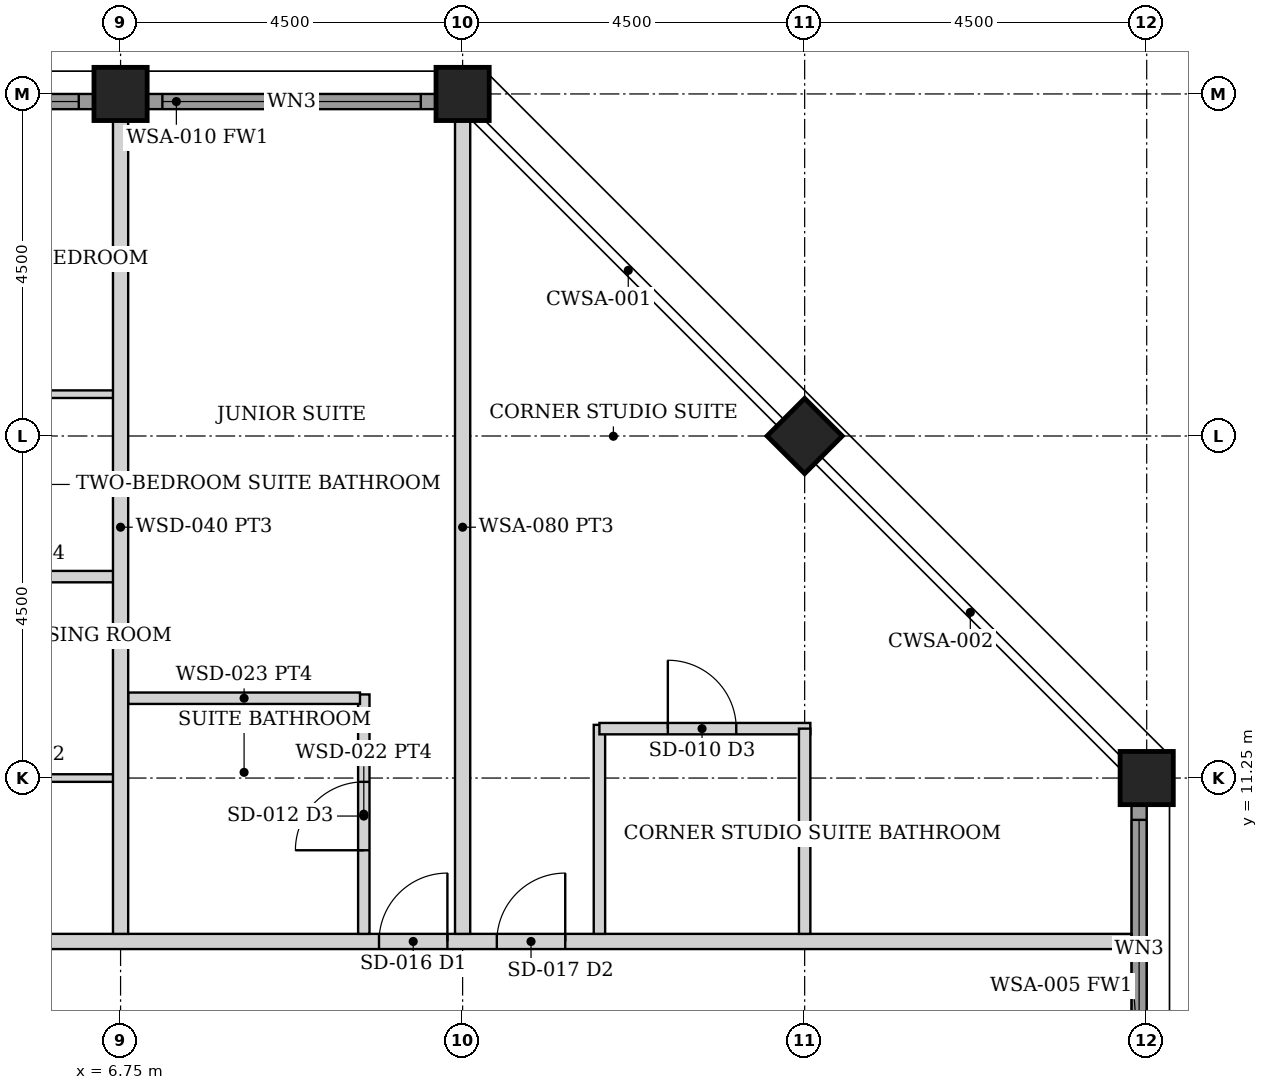
"""IFC4 building model, lengths in metres.
Left out: names, types, materials, properties, quantities, classifications, styles, units other than length and angle.
Written with IfcOpenShell. Run it as: python <this file> out.ifc"""

import sys

from ifc_helpers import new_model, si_unit, direction, frame, frame_2d, origin, origin_2d, place, context, subcontext, project, spatial, rectangle, hollow_rectangle, extrude, element, fill, save


model = new_model("IFC4")
c1 = context("Model", 3, precision=1e-05, world=origin(), true_north=direction((0.0, 1.0)))
c2 = subcontext(c1, "Body", "Model", "MODEL_VIEW")
j1 = project(units=[si_unit("LENGTHUNIT", "METRE"), si_unit("PLANEANGLEUNIT", "RADIAN")], contexts=[c1])
p1 = place(None, origin())
s1 = spatial("IfcSite", under=j1, at=p1, CompositionType="ELEMENT")
p2 = place(p1, origin())
s2 = spatial("IfcBuilding", under=s1, at=p2, CompositionType="ELEMENT")
p3 = place(p2, frame((0.0, 0.0, 234.55)))
s3 = spatial("IfcBuildingStorey", under=s2, at=p3, CompositionType="ELEMENT", Elevation=234.55)
for number, where, z_axis, x_axis in (
    (1, (6.75, 20.25, 0.0), (0.0, 0.0, 1.0), (0.0, 1.0, 0.0)),
    (2, (11.25, 20.25, 0.0), (0.0, 0.0, 1.0), (0.0, 1.0, 0.0)),
    (3, (20.25, 11.25, 0.0), (0.0, 0.0, 1.0), (1.0, 0.0, 0.0)),
    (4, (15.75, 15.75, 0.0), (0.0, 0.0, 1.0), (0.707, 0.707, 0.0)),
):
    element("IfcColumn", number, at=place(p3, frame(where, z_axis=z_axis, x_axis=x_axis)), inside=s3, PredefinedType="COLUMN", context=c2, shape_type="SweptSolid", body=[
        extrude(hollow_rectangle(XDim=0.7, YDim=0.7, WallThickness=0.04, at=origin_2d()), origin(), (0.0, 0.0, 1.0), 3.75),
    ])
p4 = place(p3, frame((20.15, 7.105, 0.0), z_axis=(0.0, 0.0, 1.0), x_axis=(0.0, 1.0, 0.0)))
e5 = element("IfcWall", 5, at=p4, inside=s3, PredefinedType="SOLIDWALL", context=c2, shape_type="SweptSolid", body=[
    extrude(rectangle(XDim=3.79, YDim=0.2, at=frame_2d((1.895, 0.0))), origin(), (0.0, 0.0, 1.0), 2.629),
])
p5 = place(p4, frame((0.195, 0.0, 0.3)))
e6 = element("IfcOpeningElement", 6, at=p5, cuts=e5, PredefinedType="OPENING", context=c2, shape_type="SweptSolid", body=[
    extrude(rectangle(XDim=3.4, YDim=2.179, at=frame_2d((1.7, 1.089))), frame((0.0, 0.11, 0.0), z_axis=(0.0, -1.0, 0.0), x_axis=(1.0, 0.0, 0.0)), (0.0, 0.0, 1.0), 0.22),
])
p6 = place(p3, frame((2.605, 20.15, 0.0), z_axis=(0.0, 0.0, 1.0), x_axis=(1.0, 0.0, 0.0)))
e7 = element("IfcWall", 7, at=p6, inside=s3, PredefinedType="SOLIDWALL", context=c2, shape_type="SweptSolid", body=[
    extrude(rectangle(XDim=3.79, YDim=0.2, at=frame_2d((1.895, 0.0))), origin(), (0.0, 0.0, 1.0), 2.629),
])
p7 = place(p6, frame((0.195, 0.0, 0.3)))
e8 = element("IfcOpeningElement", 8, at=p7, cuts=e7, PredefinedType="OPENING", context=c2, shape_type="SweptSolid", body=[
    extrude(rectangle(XDim=3.4, YDim=2.179, at=frame_2d((1.7, 1.089))), frame((0.0, 0.11, 0.0), z_axis=(0.0, -1.0, 0.0), x_axis=(1.0, 0.0, 0.0)), (0.0, 0.0, 1.0), 0.22),
])
p8 = place(p3, frame((7.105, 20.15, 0.0), z_axis=(0.0, 0.0, 1.0), x_axis=(1.0, 0.0, 0.0)))
e9 = element("IfcWall", 9, at=p8, inside=s3, PredefinedType="SOLIDWALL", context=c2, shape_type="SweptSolid", body=[
    extrude(rectangle(XDim=3.79, YDim=0.2, at=frame_2d((1.895, 0.0))), origin(), (0.0, 0.0, 1.0), 2.629),
])
p9 = place(p8, frame((0.195, 0.0, 0.3)))
e10 = element("IfcOpeningElement", 10, at=p9, cuts=e9, PredefinedType="OPENING", context=c2, shape_type="SweptSolid", body=[
    extrude(rectangle(XDim=3.4, YDim=2.179, at=frame_2d((1.7, 1.089))), frame((0.0, 0.11, 0.0), z_axis=(0.0, -1.0, 0.0), x_axis=(1.0, 0.0, 0.0)), (0.0, 0.0, 1.0), 0.22),
])
p10 = place(p3, frame((-20.05, 9.1, 0.0), z_axis=(0.0, 0.0, 1.0), x_axis=(1.0, 0.0, 0.0)))
e11 = element("IfcWall", 11, at=p10, inside=s3, PredefinedType="PARTITIONING", context=c2, shape_type="SweptSolid", body=[
    extrude(rectangle(XDim=40.1, YDim=0.2, at=frame_2d((20.05, 0.0))), origin(), (0.0, 0.0, 1.0), 2.629),
])
p11 = place(p10, frame((9.0, 0.0, 0.0)))
e12 = element("IfcOpeningElement", 12, at=p11, cuts=e11, PredefinedType="OPENING", context=c2, shape_type="SweptSolid", body=[
    extrude(rectangle(XDim=0.9, YDim=2.1, at=frame_2d((0.45, 1.05))), frame((0.0, 0.11, 0.0), z_axis=(0.0, -1.0, 0.0), x_axis=(1.0, 0.0, 0.0)), (0.0, 0.0, 1.0), 0.22),
])
p12 = place(p10, frame((13.6, 0.0, 0.0)))
e13 = element("IfcOpeningElement", 13, at=p12, cuts=e11, PredefinedType="OPENING", context=c2, shape_type="SweptSolid", body=[
    extrude(rectangle(XDim=0.9, YDim=2.1, at=frame_2d((0.45, 1.05))), frame((0.0, 0.11, 0.0), z_axis=(0.0, -1.0, 0.0), x_axis=(1.0, 0.0, 0.0)), (0.0, 0.0, 1.0), 0.22),
])
p13 = place(p10, frame((30.2, 0.0, 0.0)))
e14 = element("IfcOpeningElement", 14, at=p13, cuts=e11, PredefinedType="OPENING", context=c2, shape_type="SweptSolid", body=[
    extrude(rectangle(XDim=0.9, YDim=2.1, at=frame_2d((0.45, 1.05))), frame((0.0, 0.11, 0.0), z_axis=(0.0, -1.0, 0.0), x_axis=(1.0, 0.0, 0.0)), (0.0, 0.0, 1.0), 0.22),
])
p14 = place(p10, frame((31.75, 0.0, 0.0)))
e15 = element("IfcOpeningElement", 15, at=p14, cuts=e11, PredefinedType="OPENING", context=c2, shape_type="SweptSolid", body=[
    extrude(rectangle(XDim=0.9, YDim=2.1, at=frame_2d((0.45, 1.05))), frame((0.0, 0.11, 0.0), z_axis=(0.0, -1.0, 0.0), x_axis=(1.0, 0.0, 0.0)), (0.0, 0.0, 1.0), 0.22),
])
p15 = place(p10, frame((7.45, 0.0, 0.0)))
e16 = element("IfcOpeningElement", 16, at=p15, cuts=e11, PredefinedType="OPENING", context=c2, shape_type="SweptSolid", body=[
    extrude(rectangle(XDim=0.9, YDim=2.1, at=frame_2d((0.45, 1.05))), frame((0.0, 0.11, 0.0), z_axis=(0.0, -1.0, 0.0), x_axis=(1.0, 0.0, 0.0)), (0.0, 0.0, 1.0), 0.22),
])
p16 = place(p3, frame((3.55, 11.25, 0.0), z_axis=(0.0, 0.0, 1.0), x_axis=(1.0, 0.0, 0.0)))
e17 = element("IfcWall", 17, at=p16, inside=s3, PredefinedType="PARTITIONING", context=c2, shape_type="SweptSolid", body=[
    extrude(rectangle(XDim=3.14, YDim=0.1, at=frame_2d((1.57, 0.0))), origin(), (0.0, 0.0, 1.0), 2.629),
])
p17 = place(p3, frame((2.3, 16.3, 0.0), z_axis=(0.0, 0.0, 1.0), x_axis=(1.0, 0.0, 0.0)))
e18 = element("IfcWall", 18, at=p17, inside=s3, PredefinedType="PARTITIONING", context=c2, shape_type="SweptSolid", body=[
    extrude(rectangle(XDim=4.39, YDim=0.1, at=frame_2d((2.195, 0.0))), origin(), (0.0, 0.0, 1.0), 2.629),
])
p18 = place(p17, frame((0.175, 0.0, 0.0)))
e19 = element("IfcOpeningElement", 19, at=p18, cuts=e18, PredefinedType="OPENING", context=c2, shape_type="SweptSolid", body=[
    extrude(rectangle(XDim=0.85, YDim=2.1, at=frame_2d((0.425, 1.05))), frame((0.0, 0.06, 0.0), z_axis=(0.0, -1.0, 0.0), x_axis=(1.0, 0.0, 0.0)), (0.0, 0.0, 1.0), 0.12),
])
p19 = place(p17, frame((2.41, 0.0, 0.0)))
e20 = element("IfcOpeningElement", 20, at=p19, cuts=e18, PredefinedType="OPENING", context=c2, shape_type="SweptSolid", body=[
    extrude(rectangle(XDim=0.9, YDim=2.1, at=frame_2d((0.45, 1.05))), frame((0.0, 0.06, 0.0), z_axis=(0.0, -1.0, 0.0), x_axis=(1.0, 0.0, 0.0)), (0.0, 0.0, 1.0), 0.12),
])
p20 = place(p3, frame((3.55, 13.9, 0.0), z_axis=(0.0, 0.0, 1.0), x_axis=(1.0, 0.0, 0.0)))
e21 = element("IfcWall", 21, at=p20, inside=s3, PredefinedType="PARTITIONING", context=c2, shape_type="SweptSolid", body=[
    extrude(rectangle(XDim=3.14, YDim=0.15, at=frame_2d((1.57, 0.0))), origin(), (0.0, 0.0, 1.0), 2.629),
])
p21 = place(p3, frame((9.95, 9.2, 0.0), z_axis=(0.0, 0.0, 1.0), x_axis=(0.0, 1.0, 0.0)))
e22 = element("IfcWall", 22, at=p21, inside=s3, PredefinedType="PARTITIONING", context=c2, shape_type="SweptSolid", body=[
    extrude(rectangle(XDim=3.15, YDim=0.15, at=frame_2d((1.575, 0.0))), origin(), (0.0, 0.0, 1.0), 2.629),
])
p22 = place(p21, frame((1.1, 0.0, 0.0)))
e23 = element("IfcOpeningElement", 23, at=p22, cuts=e22, PredefinedType="OPENING", context=c2, shape_type="SweptSolid", body=[
    extrude(rectangle(XDim=0.9, YDim=2.1, at=frame_2d((0.45, 1.05))), frame((0.0, 0.085, 0.0), z_axis=(0.0, -1.0, 0.0), x_axis=(1.0, 0.0, 0.0)), (0.0, 0.0, 1.0), 0.17),
])
p23 = place(p3, frame((6.85, 12.3, 0.0), z_axis=(0.0, 0.0, 1.0), x_axis=(1.0, 0.0, 0.0)))
e24 = element("IfcWall", 24, at=p23, inside=s3, PredefinedType="PARTITIONING", context=c2, shape_type="SweptSolid", body=[
    extrude(rectangle(XDim=3.05, YDim=0.15, at=frame_2d((1.525, 0.0))), origin(), (0.0, 0.0, 1.0), 2.629),
])
for number, where, z_axis, x_axis in (
    (25, (6.75, 9.2, 0.0), (0.0, 0.0, 1.0), (0.0, 1.0, 0.0)),
    (26, (11.25, 9.2, 0.0), (0.0, 0.0, 1.0), (0.0, 1.0, 0.0)),
):
    element("IfcWall", number, at=place(p3, frame(where, z_axis=z_axis, x_axis=x_axis)), inside=s3, PredefinedType="PARTITIONING", context=c2, shape_type="SweptSolid", body=[
        extrude(rectangle(XDim=10.7, YDim=0.2, at=frame_2d((5.35, 0.0))), origin(), (0.0, 0.0, 1.0), 2.629),
    ])
p24 = place(p3, frame((13.05, 9.2, 0.0), z_axis=(0.0, 0.0, 1.0), x_axis=(0.0, 1.0, 0.0)))
e27 = element("IfcWall", 27, at=p24, inside=s3, PredefinedType="PARTITIONING", context=c2, shape_type="SweptSolid", body=[
    extrude(rectangle(XDim=2.75, YDim=0.15, at=frame_2d((1.375, 0.0))), origin(), (0.0, 0.0, 1.0), 2.629),
])
p25 = place(p3, frame((13.05, 11.9, 0.0), z_axis=(0.0, 0.0, 1.0), x_axis=(1.0, 0.0, 0.0)))
e28 = element("IfcWall", 28, at=p25, inside=s3, PredefinedType="PARTITIONING", context=c2, shape_type="SweptSolid", body=[
    extrude(rectangle(XDim=2.775, YDim=0.15, at=frame_2d((1.387, 0.0))), origin(), (0.0, 0.0, 1.0), 2.629),
])
p26 = place(p25, frame((0.9, 0.0, 0.0)))
e29 = element("IfcOpeningElement", 29, at=p26, cuts=e28, PredefinedType="OPENING", context=c2, shape_type="SweptSolid", body=[
    extrude(rectangle(XDim=0.9, YDim=2.1, at=frame_2d((0.45, 1.05))), frame((0.0, 0.085, 0.0), z_axis=(0.0, -1.0, 0.0), x_axis=(1.0, 0.0, 0.0)), (0.0, 0.0, 1.0), 0.17),
])
p27 = place(p3, frame((15.75, 9.2, 0.0), z_axis=(0.0, 0.0, 1.0), x_axis=(0.0, 1.0, 0.0)))
e30 = element("IfcWall", 30, at=p27, inside=s3, PredefinedType="PARTITIONING", context=c2, shape_type="SweptSolid", body=[
    extrude(rectangle(XDim=2.7, YDim=0.15, at=frame_2d((1.35, 0.0))), origin(), (0.0, 0.0, 1.0), 2.629),
])
p28 = place(p5, origin())
e31 = element("IfcWindow", 31, at=p28, inside=s3, PartitioningType="SINGLE_PANEL", PredefinedType="WINDOW", context=c2, shape_type="SweptSolid", body=[
    extrude(rectangle(XDim=3.4, YDim=2.179, at=frame_2d((1.7, 1.089))), frame((0.0, 0.03, 0.0), z_axis=(0.0, -1.0, 0.0), x_axis=(1.0, 0.0, 0.0)), (0.0, 0.0, 1.0), 0.06),
])
fill(e6, e31)
p29 = place(p7, origin())
e32 = element("IfcWindow", 32, at=p29, inside=s3, PartitioningType="SINGLE_PANEL", PredefinedType="WINDOW", context=c2, shape_type="SweptSolid", body=[
    extrude(rectangle(XDim=3.4, YDim=2.179, at=frame_2d((1.7, 1.089))), frame((0.0, 0.03, 0.0), z_axis=(0.0, -1.0, 0.0), x_axis=(1.0, 0.0, 0.0)), (0.0, 0.0, 1.0), 0.06),
])
fill(e8, e32)
p30 = place(p9, origin())
e33 = element("IfcWindow", 33, at=p30, inside=s3, PartitioningType="SINGLE_PANEL", PredefinedType="WINDOW", context=c2, shape_type="SweptSolid", body=[
    extrude(rectangle(XDim=3.4, YDim=2.179, at=frame_2d((1.7, 1.089))), frame((0.0, 0.03, 0.0), z_axis=(0.0, -1.0, 0.0), x_axis=(1.0, 0.0, 0.0)), (0.0, 0.0, 1.0), 0.06),
])
fill(e10, e33)
p31 = place(p13, origin())
e34 = element("IfcDoor", 34, at=p31, inside=s3, OperationType="SINGLE_SWING_RIGHT", PredefinedType="DOOR", context=c2, shape_type="SweptSolid", body=[
    extrude(rectangle(XDim=0.9, YDim=2.1, at=frame_2d((0.45, 1.05))), frame((0.0, 0.025, 0.0), z_axis=(0.0, -1.0, 0.0), x_axis=(1.0, 0.0, 0.0)), (0.0, 0.0, 1.0), 0.05),
])
fill(e14, e34)
p32 = place(p22, origin())
e35 = element("IfcDoor", 35, at=p32, inside=s3, OperationType="SINGLE_SWING_LEFT", PredefinedType="DOOR", context=c2, shape_type="SweptSolid", body=[
    extrude(rectangle(XDim=0.9, YDim=2.1, at=frame_2d((0.45, 1.05))), frame((0.0, 0.025, 0.0), z_axis=(0.0, -1.0, 0.0), x_axis=(1.0, 0.0, 0.0)), (0.0, 0.0, 1.0), 0.05),
])
fill(e23, e35)
p33 = place(p14, origin())
e36 = element("IfcDoor", 36, at=p33, inside=s3, OperationType="SINGLE_SWING_RIGHT", PredefinedType="DOOR", context=c2, shape_type="SweptSolid", body=[
    extrude(rectangle(XDim=0.9, YDim=2.1, at=frame_2d((0.45, 1.05))), frame((0.0, 0.025, 0.0), z_axis=(0.0, -1.0, 0.0), x_axis=(1.0, 0.0, 0.0)), (0.0, 0.0, 1.0), 0.05),
])
fill(e15, e36)
p34 = place(p26, origin())
e37 = element("IfcDoor", 37, at=p34, inside=s3, OperationType="SINGLE_SWING_LEFT", PredefinedType="DOOR", context=c2, shape_type="SweptSolid", body=[
    extrude(rectangle(XDim=0.9, YDim=2.1, at=frame_2d((0.45, 1.05))), frame((0.0, 0.025, 0.0), z_axis=(0.0, -1.0, 0.0), x_axis=(1.0, 0.0, 0.0)), (0.0, 0.0, 1.0), 0.05),
])
fill(e29, e37)
save(model, sys.argv[1])
